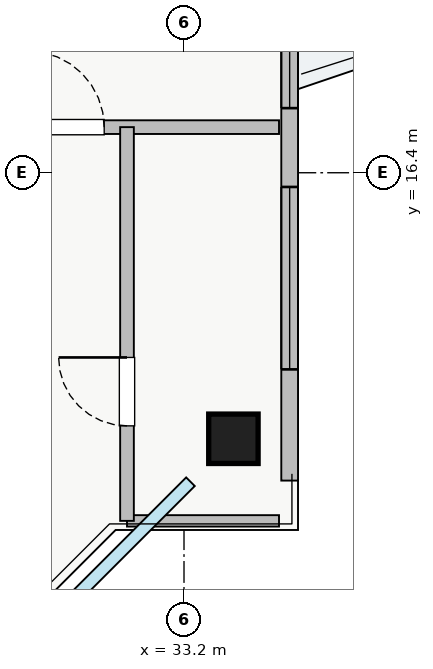
"""IFC4 building model, lengths in metres.
Left out: names, types, materials, properties, quantities, classifications, styles, units other than length and angle.
Written with IfcOpenShell. Run it as: python <this file> out.ifc"""

import sys

from ifc_helpers import new_model, si_unit, direction, frame, frame_2d, origin, origin_2d, place, context, subcontext, project, spatial, rectangle, extrude, source, transform, mapped, element, fill, save


model = new_model("IFC4")
c1 = context("Model", 3, precision=1e-05, world=origin(), true_north=direction((0.0, 1.0)))
c2 = subcontext(c1, "Body", "Model", "MODEL_VIEW")
j1 = project(units=[si_unit("LENGTHUNIT", "METRE"), si_unit("PLANEANGLEUNIT", "RADIAN")], contexts=[c1])
p1 = place(None, origin())
s1 = spatial("IfcSite", under=j1, at=p1, CompositionType="ELEMENT")
p2 = place(p1, origin())
s2 = spatial("IfcBuilding", under=s1, at=p2, CompositionType="ELEMENT")
p3 = place(p2, frame((0.0, 0.0, 250.25)))
s3 = spatial("IfcBuildingStorey", under=s2, at=p3, CompositionType="ELEMENT", Elevation=250.25)
m1 = source(origin(), c2, "Body", "SweptSolid", [
    extrude(rectangle(XDim=0.65, YDim=0.65, at=origin_2d()), origin(), (0.0, 0.0, 1.0), 3.25),
])
p4 = place(p3, frame((33.85, 12.9, 0.0), z_axis=(0.0, 0.0, 1.0), x_axis=(1.0, 0.0, 0.0)))
e1 = element("IfcColumn", 1, at=p4, inside=s3, PredefinedType="COLUMN", context=c2, shape_type="MappedRepresentation", body=[
    mapped(m1, transform((0.0, 0.0, 0.0), x_axis=(1.0, 0.0, 0.0), y_axis=(0.0, 1.0, 0.0), z_axis=(0.0, 0.0, 1.0), scale=1.0)),
])
p5 = place(p3, frame((34.59, 12.35, 0.0), z_axis=(0.0, 0.0, 1.0), x_axis=(0.0, 1.0, 0.0)))
e2 = element("IfcWall", 2, at=p5, inside=s3, PredefinedType="STANDARD", context=c2, shape_type="SweptSolid", body=[
    extrude(rectangle(XDim=21.3, YDim=0.22, at=frame_2d((10.65, 0.0))), origin(), (0.0, 0.0, 1.0), 2.61),
])
p6 = place(p5, frame((11.5, 0.0, 0.0)))
e3 = element("IfcOpeningElement", 3, at=p6, cuts=e2, PredefinedType="OPENING", context=c2, shape_type="SweptSolid", body=[
    extrude(rectangle(XDim=1.2, YDim=2.1, at=frame_2d((0.6, 1.05))), frame((0.0, 0.12, 0.0), z_axis=(0.0, -1.0, 0.0), x_axis=(1.0, 0.0, 0.0)), (0.0, 0.0, 1.0), 0.24),
])
p7 = place(p5, frame((1.463, 0.0, 0.9)))
e4 = element("IfcOpeningElement", 4, at=p7, cuts=e2, PredefinedType="OPENING", context=c2, shape_type="SweptSolid", body=[
    extrude(rectangle(XDim=2.4, YDim=1.48, at=frame_2d((1.2, 0.74))), frame((0.0, 0.12, 0.0), z_axis=(0.0, -1.0, 0.0), x_axis=(1.0, 0.0, 0.0)), (0.0, 0.0, 1.0), 0.24),
])
p8 = place(p5, frame((17.588, 0.0, 0.9)))
e5 = element("IfcOpeningElement", 5, at=p8, cuts=e2, PredefinedType="OPENING", context=c2, shape_type="SweptSolid", body=[
    extrude(rectangle(XDim=2.1, YDim=1.48, at=frame_2d((1.05, 0.74))), frame((0.0, 0.12, 0.0), z_axis=(0.0, -1.0, 0.0), x_axis=(1.0, 0.0, 0.0)), (0.0, 0.0, 1.0), 0.24),
])
p9 = place(p5, frame((4.9, 0.0, 0.9)))
e6 = element("IfcOpeningElement", 6, at=p9, cuts=e2, PredefinedType="OPENING", context=c2, shape_type="SweptSolid", body=[
    extrude(rectangle(XDim=0.9, YDim=1.2, at=frame_2d((0.45, 0.6))), frame((0.0, 0.12, 0.0), z_axis=(0.0, -1.0, 0.0), x_axis=(1.0, 0.0, 0.0)), (0.0, 0.0, 1.0), 0.24),
])
p10 = place(p5, frame((9.685, 0.0, 0.9)))
e7 = element("IfcOpeningElement", 7, at=p10, cuts=e2, PredefinedType="OPENING", context=c2, shape_type="SweptSolid", body=[
    extrude(rectangle(XDim=0.9, YDim=1.2, at=frame_2d((0.45, 0.6))), frame((0.0, 0.12, 0.0), z_axis=(0.0, -1.0, 0.0), x_axis=(1.0, 0.0, 0.0)), (0.0, 0.0, 1.0), 0.24),
])
p11 = place(p3, frame((27.8, 17.0, 0.0), z_axis=(0.0, 0.0, 1.0), x_axis=(1.0, 0.0, 0.0)))
e8 = element("IfcWall", 8, at=p11, inside=s3, PredefinedType="PARTITIONING", context=c2, shape_type="SweptSolid", body=[
    extrude(rectangle(XDim=6.65, YDim=0.18, at=frame_2d((3.325, 0.0))), origin(), (0.0, 0.0, 1.0), 3.07),
])
p12 = place(p11, frame((3.35, 0.0, 0.0)))
e9 = element("IfcOpeningElement", 9, at=p12, cuts=e8, PredefinedType="OPENING", context=c2, shape_type="SweptSolid", body=[
    extrude(rectangle(XDim=1.0, YDim=2.05, at=frame_2d((0.5, 1.025))), frame((0.0, 0.1, 0.0), z_axis=(0.0, -1.0, 0.0), x_axis=(1.0, 0.0, 0.0)), (0.0, 0.0, 1.0), 0.2),
])
p13 = place(p3, frame((32.45, 11.82, 0.0), z_axis=(0.0, 0.0, 1.0), x_axis=(1.0, 0.0, 0.0)))
e10 = element("IfcWall", 10, at=p13, inside=s3, PredefinedType="PARTITIONING", context=c2, shape_type="SweptSolid", body=[
    extrude(rectangle(XDim=2.0, YDim=0.15, at=frame_2d((1.0, 0.0))), origin(), (0.0, 0.0, 1.0), 3.07),
])
p14 = place(p3, frame((32.45, 11.82, 0.0), z_axis=(0.0, 0.0, 1.0), x_axis=(0.0, 1.0, 0.0)))
e11 = element("IfcWall", 11, at=p14, inside=s3, PredefinedType="PARTITIONING", context=c2, shape_type="SweptSolid", body=[
    extrude(rectangle(XDim=5.18, YDim=0.18, at=frame_2d((2.59, 0.0))), origin(), (0.0, 0.0, 1.0), 3.07),
])
p15 = place(p14, frame((1.25, 0.0, 0.0)))
e12 = element("IfcOpeningElement", 12, at=p15, cuts=e11, PredefinedType="OPENING", context=c2, shape_type="SweptSolid", body=[
    extrude(rectangle(XDim=0.9, YDim=2.05, at=frame_2d((0.45, 1.025))), frame((0.0, 0.1, 0.0), z_axis=(0.0, -1.0, 0.0), x_axis=(1.0, 0.0, 0.0)), (0.0, 0.0, 1.0), 0.2),
])
m2 = source(origin(), c2, "Body", "SweptSolid", [
    extrude(rectangle(XDim=2.4, YDim=1.48, at=frame_2d((1.2, 0.74))), frame((0.0, 0.03, 0.0), z_axis=(0.0, -1.0, 0.0), x_axis=(1.0, 0.0, 0.0)), (0.0, 0.0, 1.0), 0.06),
])
p16 = place(p7, origin())
e13 = element("IfcWindow", 13, at=p16, inside=s3, PartitioningType="TRIPLE_PANEL_VERTICAL", PredefinedType="WINDOW", context=c2, shape_type="MappedRepresentation", body=[
    mapped(m2, transform((0.0, 0.0, 0.0), x_axis=(1.0, 0.0, 0.0), y_axis=(0.0, 1.0, 0.0), z_axis=(0.0, 0.0, 1.0), scale=1.0)),
])
fill(e4, e13)
m3 = source(origin(), c2, "Body", "SweptSolid", [
    extrude(rectangle(XDim=1.0, YDim=2.05, at=frame_2d((0.5, 1.025))), frame((0.0, 0.025, 0.0), z_axis=(0.0, -1.0, 0.0), x_axis=(1.0, 0.0, 0.0)), (0.0, 0.0, 1.0), 0.05),
])
p17 = place(p12, origin())
e14 = element("IfcDoor", 14, at=p17, inside=s3, OperationType="SINGLE_SWING_LEFT", PredefinedType="DOOR", context=c2, shape_type="MappedRepresentation", body=[
    mapped(m3, transform((0.0, 0.0, 0.0), x_axis=(1.0, 0.0, 0.0), y_axis=(0.0, 1.0, 0.0), z_axis=(0.0, 0.0, 1.0), scale=1.0)),
])
fill(e9, e14)
m4 = source(origin(), c2, "Body", "SweptSolid", [
    extrude(rectangle(XDim=0.9, YDim=2.05, at=frame_2d((0.45, 1.025))), frame((0.0, 0.025, 0.0), z_axis=(0.0, -1.0, 0.0), x_axis=(1.0, 0.0, 0.0)), (0.0, 0.0, 1.0), 0.05),
])
p18 = place(p15, origin())
e15 = element("IfcDoor", 15, at=p18, inside=s3, OperationType="SINGLE_SWING_RIGHT", PredefinedType="DOOR", context=c2, shape_type="MappedRepresentation", body=[
    mapped(m4, transform((0.0, 0.0, 0.0), x_axis=(1.0, 0.0, 0.0), y_axis=(0.0, 1.0, 0.0), z_axis=(0.0, 0.0, 1.0), scale=1.0)),
])
fill(e12, e15)
m5 = source(origin(), c2, "Body", "SweptSolid", [
    extrude(rectangle(XDim=0.9, YDim=1.2, at=frame_2d((0.45, 0.6))), frame((0.0, 0.03, 0.0), z_axis=(0.0, -1.0, 0.0), x_axis=(1.0, 0.0, 0.0)), (0.0, 0.0, 1.0), 0.06),
])
p19 = place(p9, origin())
e16 = element("IfcWindow", 16, at=p19, inside=s3, PartitioningType="SINGLE_PANEL", PredefinedType="WINDOW", context=c2, shape_type="MappedRepresentation", body=[
    mapped(m5, transform((0.0, 0.0, 0.0), x_axis=(1.0, 0.0, 0.0), y_axis=(0.0, 1.0, 0.0), z_axis=(0.0, 0.0, 1.0), scale=1.0)),
])
fill(e6, e16)
save(model, sys.argv[1])
